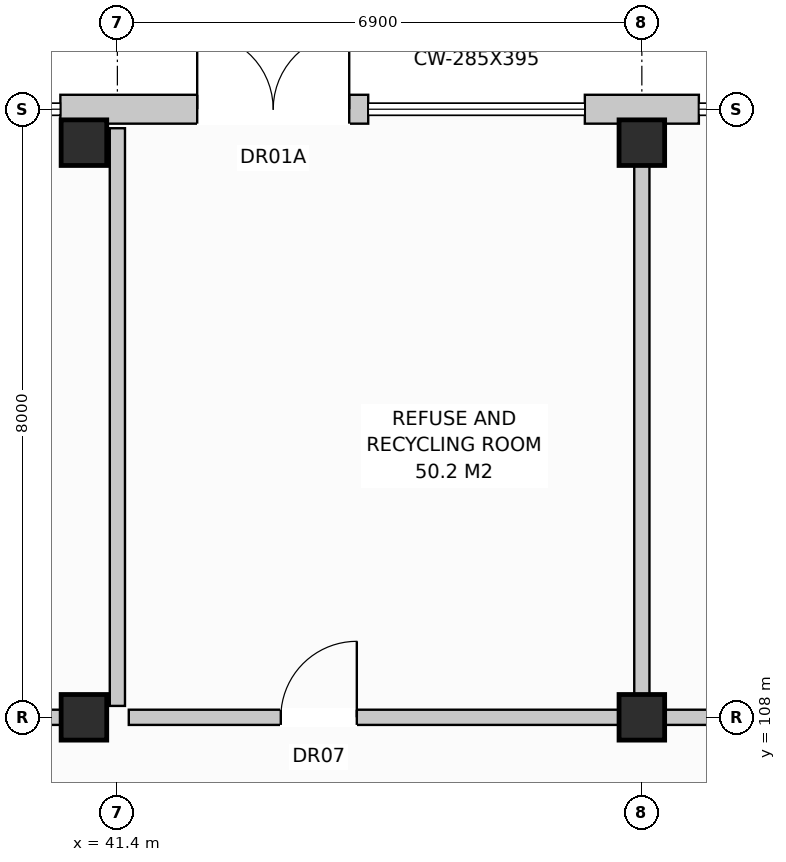
"""IFC4 building model, lengths in metres.
Left out: names, types, materials, properties, quantities, classifications, styles, units other than length and angle.
Written with IfcOpenShell. Run it as: python <this file> out.ifc"""

import sys

from ifc_helpers import new_model, si_unit, direction, frame, frame_2d, origin, origin_with_axes, origin_2d, place, context, subcontext, project, spatial, rectangle, extrude, element, fill, save


model = new_model("IFC4")
c1 = context("Model", 3, precision=1e-05, world=origin(), true_north=direction((0.0, 1.0)))
c2 = subcontext(c1, "Body", "Model", "MODEL_VIEW")
j1 = project(units=[si_unit("LENGTHUNIT", "METRE"), si_unit("PLANEANGLEUNIT", "RADIAN")], contexts=[c1])
p1 = place(None, origin())
s1 = spatial("IfcSite", under=j1, at=p1, CompositionType="ELEMENT")
p2 = place(p1, origin())
s2 = spatial("IfcBuilding", under=s1, at=p2, CompositionType="ELEMENT")
p3 = place(p2, origin())
s3 = spatial("IfcBuildingStorey", under=s2, at=p3, CompositionType="ELEMENT", Elevation=0.0)
for number, where, z_axis, x_axis in (
    (1, (40.96, 108.0, 0.0), (0.0, 0.0, 1.0), (1.0, 0.0, 0.0)),
    (2, (40.96, 115.56, 0.0), (0.0, 0.0, 1.0), (1.0, 0.0, 0.0)),
    (3, (48.3, 108.0, 0.0), (0.0, 0.0, 1.0), (1.0, 0.0, 0.0)),
    (4, (48.3, 115.56, 0.0), (0.0, 0.0, 1.0), (1.0, 0.0, 0.0)),
):
    element("IfcColumn", number, at=place(p3, frame(where, z_axis=z_axis, x_axis=x_axis)), inside=s3, PredefinedType="COLUMN", context=c2, shape_type="SweptSolid", body=[
        extrude(rectangle(XDim=0.6, YDim=0.6, at=origin_2d()), origin(), (0.0, 0.0, 1.0), 4.4),
    ])
p4 = place(p3, frame((40.65, 116.0, 0.0), z_axis=(0.0, 0.0, 1.0), x_axis=(1.0, 0.0, 0.0)))
e5 = element("IfcWall", 5, at=p4, inside=s3, PredefinedType="STANDARD", context=c2, shape_type="SweptSolid", body=[
    extrude(rectangle(XDim=4.05, YDim=0.38, at=frame_2d((2.025, 0.0))), origin(), (0.0, 0.0, 1.0), 4.12),
])
p5 = place(p4, frame((1.8, 0.0, 0.0)))
e6 = element("IfcOpeningElement", 6, at=p5, cuts=e5, PredefinedType="OPENING", context=c2, shape_type="SweptSolid", body=[
    extrude(rectangle(XDim=2.0, YDim=2.45, at=frame_2d((1.0, 1.225))), frame((0.0, 0.202, 0.0), z_axis=(0.0, -1.0, 0.0), x_axis=(1.0, 0.0, 0.0)), (0.0, 0.0, 1.0), 0.404),
])
p6 = place(p3, frame((47.55, 116.0, 0.0), z_axis=(0.0, 0.0, 1.0), x_axis=(1.0, 0.0, 0.0)))
e7 = element("IfcWall", 7, at=p6, inside=s3, PredefinedType="STANDARD", context=c2, shape_type="SweptSolid", body=[
    extrude(rectangle(XDim=1.5, YDim=0.38, at=frame_2d((0.75, 0.0))), origin(), (0.0, 0.0, 1.0), 4.12),
])
p7 = place(p3, frame((27.75, 108.0, 0.0), z_axis=(0.0, 0.0, 1.0), x_axis=(1.0, 0.0, 0.0)))
e8 = element("IfcWall", 8, at=p7, inside=s3, PredefinedType="PARTITIONING", context=c2, shape_type="SweptSolid", body=[
    extrude(rectangle(XDim=13.5, YDim=0.2, at=frame_2d((6.75, 0.0))), origin(), (0.0, 0.0, 1.0), 3.56),
])
p8 = place(p7, frame((2.0, 0.0, 0.0)))
e9 = element("IfcOpeningElement", 9, at=p8, cuts=e8, PredefinedType="OPENING", context=c2, shape_type="SweptSolid", body=[
    extrude(rectangle(XDim=1.0, YDim=2.15, at=frame_2d((0.5, 1.075))), frame((0.0, 0.112, 0.0), z_axis=(0.0, -1.0, 0.0), x_axis=(1.0, 0.0, 0.0)), (0.0, 0.0, 1.0), 0.224),
])
p9 = place(p3, frame((41.4, 108.15, 0.0), z_axis=(0.0, 0.0, 1.0), x_axis=(0.0, 1.0, 0.0)))
e10 = element("IfcWall", 10, at=p9, inside=s3, PredefinedType="PARTITIONING", context=c2, shape_type="SweptSolid", body=[
    extrude(rectangle(XDim=7.6, YDim=0.2, at=frame_2d((3.8, 0.0))), origin(), (0.0, 0.0, 1.0), 4.12),
])
p10 = place(p3, frame((41.55, 108.0, 0.0), z_axis=(0.0, 0.0, 1.0), x_axis=(1.0, 0.0, 0.0)))
e11 = element("IfcWall", 11, at=p10, inside=s3, PredefinedType="PARTITIONING", context=c2, shape_type="SweptSolid", body=[
    extrude(rectangle(XDim=6.6, YDim=0.2, at=frame_2d((3.3, 0.0))), origin(), (0.0, 0.0, 1.0), 3.56),
])
p11 = place(p10, frame((2.0, 0.0, 0.0)))
e12 = element("IfcOpeningElement", 12, at=p11, cuts=e11, PredefinedType="OPENING", context=c2, shape_type="SweptSolid", body=[
    extrude(rectangle(XDim=1.0, YDim=2.15, at=frame_2d((0.5, 1.075))), frame((0.0, 0.112, 0.0), z_axis=(0.0, -1.0, 0.0), x_axis=(1.0, 0.0, 0.0)), (0.0, 0.0, 1.0), 0.224),
])
p12 = place(p3, frame((48.3, 108.15, 0.0), z_axis=(0.0, 0.0, 1.0), x_axis=(0.0, 1.0, 0.0)))
e13 = element("IfcWall", 13, at=p12, inside=s3, PredefinedType="PARTITIONING", context=c2, shape_type="SweptSolid", body=[
    extrude(rectangle(XDim=7.6, YDim=0.2, at=frame_2d((3.8, 0.0))), origin(), (0.0, 0.0, 1.0), 3.56),
])
p13 = place(p3, frame((48.45, 108.0, 0.0), z_axis=(0.0, 0.0, 1.0), x_axis=(1.0, 0.0, 0.0)))
e14 = element("IfcWall", 14, at=p13, inside=s3, PredefinedType="PARTITIONING", context=c2, shape_type="SweptSolid", body=[
    extrude(rectangle(XDim=6.45, YDim=0.2, at=frame_2d((3.225, 0.0))), origin(), (0.0, 0.0, 1.0), 3.56),
])
p14 = place(p13, frame((2.0, 0.0, 0.0)))
e15 = element("IfcOpeningElement", 15, at=p14, cuts=e14, PredefinedType="OPENING", context=c2, shape_type="SweptSolid", body=[
    extrude(rectangle(XDim=1.0, YDim=2.15, at=frame_2d((0.5, 1.075))), frame((0.0, 0.112, 0.0), z_axis=(0.0, -1.0, 0.0), x_axis=(1.0, 0.0, 0.0)), (0.0, 0.0, 1.0), 0.224),
])
p15 = place(p5, origin_with_axes())
e16 = element("IfcDoor", 16, at=p15, inside=s3, OperationType="DOUBLE_DOOR_SINGLE_SWING", PredefinedType="DOOR", context=c2, shape_type="SweptSolid", body=[
    extrude(rectangle(XDim=2.0, YDim=2.45, at=frame_2d((1.0, 1.225))), frame((0.0, 0.025, 0.0), z_axis=(0.0, -1.0, 0.0), x_axis=(1.0, 0.0, 0.0)), (0.0, 0.0, 1.0), 0.05),
])
fill(e6, e16)
p16 = place(p11, origin_with_axes())
e17 = element("IfcDoor", 17, at=p16, inside=s3, OperationType="SINGLE_SWING_RIGHT", PredefinedType="DOOR", context=c2, shape_type="SweptSolid", body=[
    extrude(rectangle(XDim=1.0, YDim=2.15, at=frame_2d((0.5, 1.075))), frame((0.0, 0.025, 0.0), z_axis=(0.0, -1.0, 0.0), x_axis=(1.0, 0.0, 0.0)), (0.0, 0.0, 1.0), 0.05),
])
fill(e12, e17)
save(model, sys.argv[1])
